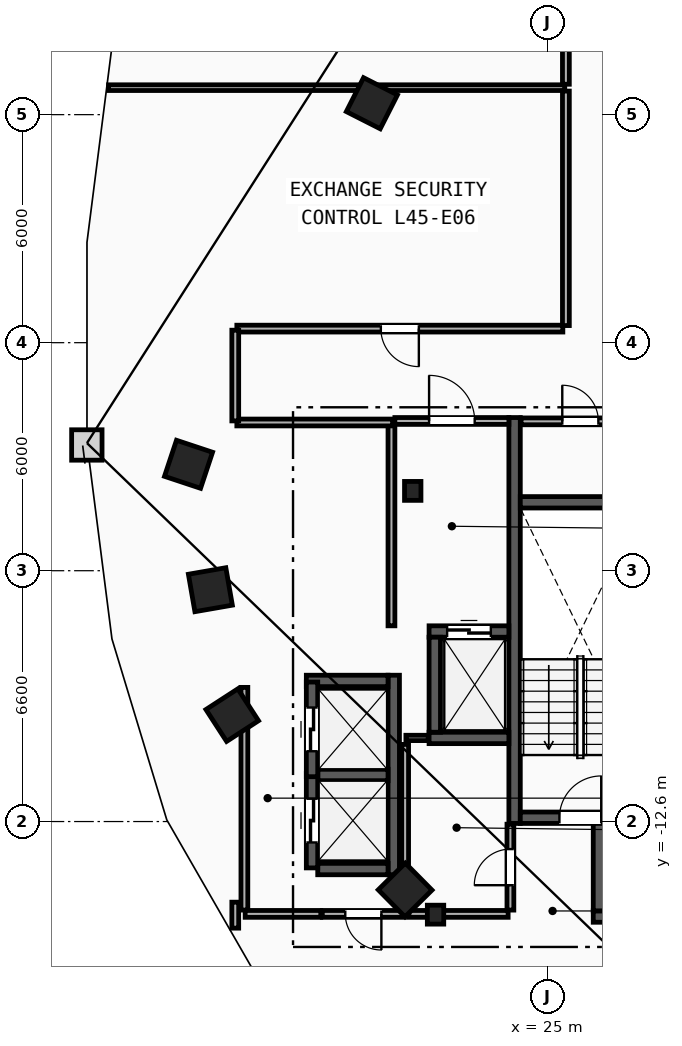
"""IFC4 building model, lengths in metres.
Left out: names, types, materials, properties, quantities, classifications, styles, units other than length and angle.
Written with IfcOpenShell. Run it as: python <this file> out.ifc"""

import sys

from ifc_helpers import new_model, si_unit, direction, frame, frame_2d, origin, origin_2d, place, context, subcontext, project, spatial, rectangle, i_section, extrude, element, fill, save


model = new_model("IFC4")
c1 = context("Model", 3, precision=1e-05, world=origin(), true_north=direction((0.0, 1.0)))
c2 = subcontext(c1, "Body", "Model", "MODEL_VIEW")
j1 = project(units=[si_unit("LENGTHUNIT", "METRE"), si_unit("PLANEANGLEUNIT", "RADIAN")], contexts=[c1])
p1 = place(None, origin())
s1 = spatial("IfcSite", under=j1, at=p1, CompositionType="ELEMENT")
p2 = place(p1, origin())
s2 = spatial("IfcBuilding", under=s1, at=p2, CompositionType="ELEMENT")
p3 = place(p2, frame((0.0, 0.0, 172.8)))
s3 = spatial("IfcBuildingStorey", under=s2, at=p3, CompositionType="ELEMENT", Elevation=172.8)
for number, where, z_axis, x_axis in (
    (1, (21.45, -3.9, 0.0), (0.0, 0.0, 1.0), (1.0, 0.0, 0.0)),
    (2, (22.05, -15.05, 0.0), (0.0, 0.0, 1.0), (1.0, 0.0, 0.0)),
):
    element("IfcColumn", number, at=place(p3, frame(where, z_axis=z_axis, x_axis=x_axis)), inside=s3, PredefinedType="COLUMN", context=c2, shape_type="SweptSolid", body=[
        extrude(i_section(OverallWidth=0.432, OverallDepth=0.498, WebThickness=0.056, FlangeThickness=0.089, FilletRadius=0.018, at=origin_2d()), origin(), (0.0, 0.0, 1.0), 3.6),
    ])
for number, where, z_axis, x_axis in (
    (3, (15.55, -3.2, 0.0), (0.0, 0.0, 1.0), (-0.315, -0.949, 0.0)),
    (4, (16.125, -6.5, 0.0), (0.0, 0.0, 1.0), (0.172, -0.985, 0.0)),
    (5, (16.7, -9.8, 0.0), (0.0, 0.0, 1.0), (0.544, -0.839, 0.0)),
    (6, (21.25, -14.4, 0.0), (0.0, 0.0, 1.0), (0.703, -0.711, 0.0)),
    (7, (20.375, 6.3, 0.0), (0.0, 0.0, 1.0), (-0.453, -0.892, 0.0)),
):
    element("IfcColumn", number, at=place(p3, frame(where, z_axis=z_axis, x_axis=x_axis)), inside=s3, PredefinedType="COLUMN", context=c2, shape_type="SweptSolid", body=[
        extrude(rectangle(XDim=1.0, YDim=1.0, at=origin_2d()), origin(), (0.0, 0.0, 1.0), 3.6),
    ])
p4 = place(p3, frame((24.13, -12.65, 0.0), z_axis=(0.0, 0.0, 1.0), x_axis=(0.0, 1.0, 0.0)))
e8 = element("IfcWall", 8, at=p4, inside=s3, PredefinedType="SHEAR", context=c2, shape_type="SweptSolid", body=[
    extrude(rectangle(XDim=10.68, YDim=0.3, at=frame_2d((5.34, 0.0))), origin(), (0.0, 0.0, 1.0), 3.36),
])
p5 = place(p3, frame((24.28, -12.5, 0.0), z_axis=(0.0, 0.0, 1.0), x_axis=(1.0, 0.0, 0.0)))
e9 = element("IfcWall", 9, at=p5, inside=s3, PredefinedType="SHEAR", context=c2, shape_type="SweptSolid", body=[
    extrude(rectangle(XDim=3.16, YDim=0.3, at=frame_2d((1.58, 0.0))), origin(), (0.0, 0.0, 1.0), 3.36),
])
p6 = place(p5, frame((1.03, 0.0, 0.0)))
e10 = element("IfcOpeningElement", 10, at=p6, cuts=e9, PredefinedType="OPENING", context=c2, shape_type="SweptSolid", body=[
    extrude(rectangle(XDim=1.1, YDim=2.15, at=frame_2d((0.55, 1.075))), frame((0.0, 0.16, 0.0), z_axis=(0.0, -1.0, 0.0), x_axis=(1.0, 0.0, 0.0)), (0.0, 0.0, 1.0), 0.32),
])
p7 = place(p3, frame((24.28, -4.2, 0.0), z_axis=(0.0, 0.0, 1.0), x_axis=(1.0, 0.0, 0.0)))
e11 = element("IfcWall", 11, at=p7, inside=s3, PredefinedType="SHEAR", context=c2, shape_type="SweptSolid", body=[
    extrude(rectangle(XDim=3.16, YDim=0.3, at=frame_2d((1.58, 0.0))), origin(), (0.0, 0.0, 1.0), 3.36),
])
p8 = place(p3, frame((20.89, -7.45, 0.0), z_axis=(0.0, 0.0, 1.0), x_axis=(0.0, 1.0, 0.0)))
e12 = element("IfcWall", 12, at=p8, inside=s3, PredefinedType="PARTITIONING", context=c2, shape_type="SweptSolid", body=[
    extrude(rectangle(XDim=5.3, YDim=0.18, at=frame_2d((2.65, 0.0))), origin(), (0.0, 0.0, 1.0), 3.36),
])
p9 = place(p3, frame((20.98, -2.06, 0.0), z_axis=(0.0, 0.0, 1.0), x_axis=(1.0, 0.0, 0.0)))
e13 = element("IfcWall", 13, at=p9, inside=s3, PredefinedType="PARTITIONING", context=c2, shape_type="SweptSolid", body=[
    extrude(rectangle(XDim=3.0, YDim=0.18, at=frame_2d((1.5, 0.0))), origin(), (0.0, 0.0, 1.0), 3.36),
])
p10 = place(p9, frame((0.9, 0.0, 0.0)))
e14 = element("IfcOpeningElement", 14, at=p10, cuts=e13, PredefinedType="OPENING", context=c2, shape_type="SweptSolid", body=[
    extrude(rectangle(XDim=1.2, YDim=2.15, at=frame_2d((0.6, 1.075))), frame((0.0, 0.1, 0.0), z_axis=(0.0, -1.0, 0.0), x_axis=(1.0, 0.0, 0.0)), (0.0, 0.0, 1.0), 0.2),
])
p11 = place(p3, frame((21.88, -7.6, 0.0), z_axis=(0.0, 0.0, 1.0), x_axis=(1.0, 0.0, 0.0)))
e15 = element("IfcWall", 15, at=p11, inside=s3, PredefinedType="SHEAR", context=c2, shape_type="SweptSolid", body=[
    extrude(rectangle(XDim=2.1, YDim=0.3, at=frame_2d((1.05, 0.0))), origin(), (0.0, 0.0, 1.0), 3.36),
])
p12 = place(p11, frame((0.475, 0.0, 0.0)))
e16 = element("IfcOpeningElement", 16, at=p12, cuts=e15, PredefinedType="OPENING", context=c2, shape_type="SweptSolid", body=[
    extrude(rectangle(XDim=1.15, YDim=2.2, at=frame_2d((0.575, 1.1))), frame((0.0, 0.16, 0.0), z_axis=(0.0, -1.0, 0.0), x_axis=(1.0, 0.0, 0.0)), (0.0, 0.0, 1.0), 0.32),
])
p13 = place(p3, frame((21.88, -10.4, 0.0), z_axis=(0.0, 0.0, 1.0), x_axis=(1.0, 0.0, 0.0)))
e17 = element("IfcWall", 17, at=p13, inside=s3, PredefinedType="SHEAR", context=c2, shape_type="SweptSolid", body=[
    extrude(rectangle(XDim=2.1, YDim=0.3, at=frame_2d((1.05, 0.0))), origin(), (0.0, 0.0, 1.0), 3.36),
])
for number, where, z_axis, x_axis in (
    (18, (22.03, -10.25, 0.0), (0.0, 0.0, 1.0), (0.0, 1.0, 0.0)),
    (19, (26.2, -15.1, 0.0), (0.0, 0.0, 1.0), (1.0, 0.0, 0.0)),
):
    element("IfcWall", number, at=place(p3, frame(where, z_axis=z_axis, x_axis=x_axis)), inside=s3, PredefinedType="SHEAR", context=c2, shape_type="SweptSolid", body=[
        extrude(rectangle(XDim=2.5, YDim=0.3, at=frame_2d((1.25, 0.0))), origin(), (0.0, 0.0, 1.0), 3.36),
    ])
p14 = place(p3, frame((26.35, -14.95, 0.0), z_axis=(0.0, 0.0, 1.0), x_axis=(0.0, 1.0, 0.0)))
e20 = element("IfcWall", 20, at=p14, inside=s3, PredefinedType="SHEAR", context=c2, shape_type="SweptSolid", body=[
    extrude(rectangle(XDim=2.3, YDim=0.3, at=frame_2d((1.15, 0.0))), origin(), (0.0, 0.0, 1.0), 3.36),
])
p15 = place(p3, frame((20.95, -14.0, 0.0), z_axis=(0.0, 0.0, 1.0), x_axis=(0.0, 1.0, 0.0)))
e21 = element("IfcWall", 21, at=p15, inside=s3, PredefinedType="SHEAR", context=c2, shape_type="SweptSolid", body=[
    extrude(rectangle(XDim=5.25, YDim=0.3, at=frame_2d((2.625, 0.0))), origin(), (0.0, 0.0, 1.0), 3.36),
])
p16 = place(p3, frame((18.95, -13.85, 0.0), z_axis=(0.0, 0.0, 1.0), x_axis=(1.0, 0.0, 0.0)))
e22 = element("IfcWall", 22, at=p16, inside=s3, PredefinedType="SHEAR", context=c2, shape_type="SweptSolid", body=[
    extrude(rectangle(XDim=1.85, YDim=0.3, at=frame_2d((0.925, 0.0))), origin(), (0.0, 0.0, 1.0), 3.36),
])
p17 = place(p3, frame((18.65, -8.9, 0.0), z_axis=(0.0, 0.0, 1.0), x_axis=(1.0, 0.0, 0.0)))
e23 = element("IfcWall", 23, at=p17, inside=s3, PredefinedType="SHEAR", context=c2, shape_type="SweptSolid", body=[
    extrude(rectangle(XDim=2.15, YDim=0.3, at=frame_2d((1.075, 0.0))), origin(), (0.0, 0.0, 1.0), 3.36),
])
p18 = place(p3, frame((18.95, -11.375, 0.0), z_axis=(0.0, 0.0, 1.0), x_axis=(1.0, 0.0, 0.0)))
e24 = element("IfcWall", 24, at=p18, inside=s3, PredefinedType="SHEAR", context=c2, shape_type="SweptSolid", body=[
    extrude(rectangle(XDim=1.85, YDim=0.3, at=frame_2d((0.925, 0.0))), origin(), (0.0, 0.0, 1.0), 3.36),
])
p19 = place(p3, frame((18.8, -13.82, 0.0), z_axis=(0.0, 0.0, 1.0), x_axis=(0.0, 1.0, 0.0)))
e25 = element("IfcWall", 25, at=p19, inside=s3, PredefinedType="SHEAR", context=c2, shape_type="SweptSolid", body=[
    extrude(rectangle(XDim=2.49, YDim=0.3, at=frame_2d((1.245, 0.0))), origin(), (0.0, 0.0, 1.0), 3.36),
])
p20 = place(p19, frame((0.67, 0.0, 0.0)))
e26 = element("IfcOpeningElement", 26, at=p20, cuts=e25, PredefinedType="OPENING", context=c2, shape_type="SweptSolid", body=[
    extrude(rectangle(XDim=1.15, YDim=2.2, at=frame_2d((0.575, 1.1))), frame((0.0, 0.16, 0.0), z_axis=(0.0, -1.0, 0.0), x_axis=(1.0, 0.0, 0.0)), (0.0, 0.0, 1.0), 0.32),
])
p21 = place(p3, frame((18.8, -11.42, 0.0), z_axis=(0.0, 0.0, 1.0), x_axis=(0.0, 1.0, 0.0)))
e27 = element("IfcWall", 27, at=p21, inside=s3, PredefinedType="SHEAR", context=c2, shape_type="SweptSolid", body=[
    extrude(rectangle(XDim=2.49, YDim=0.3, at=frame_2d((1.245, 0.0))), origin(), (0.0, 0.0, 1.0), 3.36),
])
p22 = place(p21, frame((0.67, 0.0, 0.0)))
e28 = element("IfcOpeningElement", 28, at=p22, cuts=e27, PredefinedType="OPENING", context=c2, shape_type="SweptSolid", body=[
    extrude(rectangle(XDim=1.15, YDim=2.2, at=frame_2d((0.575, 1.1))), frame((0.0, 0.16, 0.0), z_axis=(0.0, -1.0, 0.0), x_axis=(1.0, 0.0, 0.0)), (0.0, 0.0, 1.0), 0.32),
])
p23 = place(p3, frame((17.02, -14.93, 0.0), z_axis=(0.0, 0.0, 1.0), x_axis=(0.0, 1.0, 0.0)))
e29 = element("IfcWall", 29, at=p23, inside=s3, PredefinedType="PARTITIONING", context=c2, shape_type="SweptSolid", body=[
    extrude(rectangle(XDim=5.86, YDim=0.18, at=frame_2d((2.93, 0.0))), origin(), (0.0, 0.0, 1.0), 3.36),
])
p24 = place(p3, frame((17.04, -15.03, 0.0), z_axis=(0.0, 0.0, 1.0), x_axis=(1.0, 0.0, 0.0)))
e30 = element("IfcWall", 30, at=p24, inside=s3, PredefinedType="PARTITIONING", context=c2, shape_type="SweptSolid", body=[
    extrude(rectangle(XDim=1.99, YDim=0.18, at=frame_2d((0.995, 0.0))), origin(), (0.0, 0.0, 1.0), 3.36),
])
p25 = place(p3, frame((21.23, -15.03, 0.0), z_axis=(0.0, 0.0, 1.0), x_axis=(-1.0, 0.0, 0.0)))
e31 = element("IfcWall", 31, at=p25, inside=s3, PredefinedType="PARTITIONING", context=c2, shape_type="SweptSolid", body=[
    extrude(rectangle(XDim=2.16, YDim=0.18, at=frame_2d((1.08, 0.0))), origin(), (0.0, 0.0, 1.0), 3.36),
])
p26 = place(p25, frame((0.605, 0.0, 0.0)))
e32 = element("IfcOpeningElement", 32, at=p26, cuts=e31, PredefinedType="OPENING", context=c2, shape_type="SweptSolid", body=[
    extrude(rectangle(XDim=0.95, YDim=2.1, at=frame_2d((0.475, 1.05))), frame((0.0, 0.1, 0.0), z_axis=(0.0, -1.0, 0.0), x_axis=(1.0, 0.0, 0.0)), (0.0, 0.0, 1.0), 0.2),
])
p27 = place(p3, frame((21.27, -10.4, 0.0), z_axis=(0.0, 0.0, 1.0), x_axis=(1.0, 0.0, 0.0)))
e33 = element("IfcWall", 33, at=p27, inside=s3, PredefinedType="PARTITIONING", context=c2, shape_type="SweptSolid", body=[
    extrude(rectangle(XDim=0.59, YDim=0.14, at=frame_2d((0.295, 0.0))), origin(), (0.0, 0.0, 1.0), 3.36),
])
p28 = place(p3, frame((21.25, -14.93, 0.0), z_axis=(0.0, 0.0, 1.0), x_axis=(0.0, 1.0, 0.0)))
e34 = element("IfcWall", 34, at=p28, inside=s3, PredefinedType="PARTITIONING", context=c2, shape_type="SweptSolid", body=[
    extrude(rectangle(XDim=4.36, YDim=0.18, at=frame_2d((2.18, 0.0))), origin(), (0.0, 0.0, 1.0), 3.36),
])
p29 = place(p3, frame((21.35, -15.03, 0.0), z_axis=(0.0, 0.0, 1.0), x_axis=(1.0, 0.0, 0.0)))
e35 = element("IfcWall", 35, at=p29, inside=s3, PredefinedType="PARTITIONING", context=c2, shape_type="SweptSolid", body=[
    extrude(rectangle(XDim=2.61, YDim=0.18, at=frame_2d((1.305, 0.0))), origin(), (0.0, 0.0, 1.0), 2.433),
])
p30 = place(p3, frame((24.3, -2.07, 0.0), z_axis=(0.0, 0.0, 1.0), x_axis=(1.0, 0.0, 0.0)))
e36 = element("IfcWall", 36, at=p30, inside=s3, PredefinedType="PARTITIONING", context=c2, shape_type="SweptSolid", body=[
    extrude(rectangle(XDim=3.12, YDim=0.18, at=frame_2d((1.56, 0.0))), origin(), (0.0, 0.0, 1.0), 3.36),
])
p31 = place(p30, frame((1.085, 0.0, 0.0)))
e37 = element("IfcOpeningElement", 37, at=p31, cuts=e36, PredefinedType="OPENING", context=c2, shape_type="SweptSolid", body=[
    extrude(rectangle(XDim=0.95, YDim=2.1, at=frame_2d((0.475, 1.05))), frame((0.0, 0.1, 0.0), z_axis=(0.0, -1.0, 0.0), x_axis=(1.0, 0.0, 0.0)), (0.0, 0.0, 1.0), 0.2),
])
p32 = place(p3, frame((24.02, -14.93, 0.0), z_axis=(0.0, 0.0, 1.0), x_axis=(0.0, 1.0, 0.0)))
e38 = element("IfcWall", 38, at=p32, inside=s3, PredefinedType="PARTITIONING", context=c2, shape_type="SweptSolid", body=[
    extrude(rectangle(XDim=2.26, YDim=0.18, at=frame_2d((1.13, 0.0))), origin(), (0.0, 0.0, 1.0), 3.36),
])
p33 = place(p32, frame((0.655, 0.0, 0.0)))
e39 = element("IfcOpeningElement", 39, at=p33, cuts=e38, PredefinedType="OPENING", context=c2, shape_type="SweptSolid", body=[
    extrude(rectangle(XDim=0.95, YDim=2.1, at=frame_2d((0.475, 1.05))), frame((0.0, 0.1, 0.0), z_axis=(0.0, -1.0, 0.0), x_axis=(1.0, 0.0, 0.0)), (0.0, 0.0, 1.0), 0.2),
])
p34 = place(p3, frame((13.447, 6.71, 0.0), z_axis=(0.0, 0.0, 1.0), x_axis=(1.0, 0.0, 0.0)))
e40 = element("IfcWall", 40, at=p34, inside=s3, PredefinedType="PARTITIONING", context=c2, shape_type="SweptSolid", body=[
    extrude(rectangle(XDim=12.003, YDim=0.15, at=frame_2d((6.001, 0.0))), origin(), (0.0, 0.0, 1.0), 3.36),
])
p35 = place(p3, frame((25.4, 0.37, 0.0), z_axis=(0.0, 0.0, 1.0), x_axis=(-1.0, 0.0, 0.0)))
e41 = element("IfcWall", 41, at=p35, inside=s3, PredefinedType="PARTITIONING", context=c2, shape_type="SweptSolid", body=[
    extrude(rectangle(XDim=8.578, YDim=0.18, at=frame_2d((4.289, 0.0))), origin(), (0.0, 0.0, 1.0), 3.36),
])
p36 = place(p35, frame((3.789, 0.0, 0.0)))
e42 = element("IfcOpeningElement", 42, at=p36, cuts=e41, PredefinedType="OPENING", context=c2, shape_type="SweptSolid", body=[
    extrude(rectangle(XDim=1.0, YDim=2.15, at=frame_2d((0.5, 1.075))), frame((0.0, 0.1, 0.0), z_axis=(0.0, -1.0, 0.0), x_axis=(1.0, 0.0, 0.0)), (0.0, 0.0, 1.0), 0.2),
])
p37 = place(p3, frame((25.48, 6.62, 0.0), z_axis=(0.0, 0.0, 1.0), x_axis=(0.0, -1.0, 0.0)))
e43 = element("IfcWall", 43, at=p37, inside=s3, PredefinedType="PARTITIONING", context=c2, shape_type="SweptSolid", body=[
    extrude(rectangle(XDim=6.17, YDim=0.18, at=frame_2d((3.085, 0.0))), origin(), (0.0, 0.0, 1.0), 3.36),
])
p38 = place(p3, frame((16.822, -2.1, 0.0), z_axis=(0.0, 0.0, 1.0), x_axis=(1.0, 0.0, 0.0)))
e44 = element("IfcWall", 44, at=p38, inside=s3, PredefinedType="PARTITIONING", context=c2, shape_type="SweptSolid", body=[
    extrude(rectangle(XDim=4.098, YDim=0.18, at=frame_2d((2.049, 0.0))), origin(), (0.0, 0.0, 1.0), 3.36),
])
p39 = place(p3, frame((16.78, 0.329, 0.0), z_axis=(0.0, 0.0, 1.0), x_axis=(0.0, -1.0, 0.0)))
e45 = element("IfcWall", 45, at=p39, inside=s3, PredefinedType="PARTITIONING", context=c2, shape_type="SweptSolid", body=[
    extrude(rectangle(XDim=2.387, YDim=0.18, at=frame_2d((1.194, 0.0))), origin(), (0.0, 0.0, 1.0), 3.36),
])
p40 = place(p3, frame((16.78, -14.721, 0.0), z_axis=(0.0, 0.0, 1.0), x_axis=(0.0, -1.0, 0.0)))
e46 = element("IfcWall", 46, at=p40, inside=s3, PredefinedType="PARTITIONING", context=c2, shape_type="SweptSolid", body=[
    extrude(rectangle(XDim=0.684, YDim=0.18, at=frame_2d((0.342, 0.0))), origin(), (0.0, 0.0, 1.0), 3.36),
])
p41 = place(p3, frame((25.48, 11.178, 0.0), z_axis=(0.0, 0.0, 1.0), x_axis=(0.0, -1.0, 0.0)))
e47 = element("IfcWall", 47, at=p41, inside=s3, PredefinedType="PARTITIONING", context=c2, shape_type="SweptSolid", body=[
    extrude(rectangle(XDim=4.378, YDim=0.18, at=frame_2d((2.189, 0.0))), origin(), (0.0, 0.0, 1.0), 3.36),
])
p42 = place(p41, frame((1.689, 0.0, 0.0)))
e48 = element("IfcOpeningElement", 48, at=p42, cuts=e47, PredefinedType="OPENING", context=c2, shape_type="SweptSolid", body=[
    extrude(rectangle(XDim=1.0, YDim=2.15, at=frame_2d((0.5, 1.075))), frame((0.0, 0.1, 0.0), z_axis=(0.0, -1.0, 0.0), x_axis=(1.0, 0.0, 0.0)), (0.0, 0.0, 1.0), 0.2),
])
p43 = place(p6, origin())
e49 = element("IfcDoor", 49, at=p43, inside=s3, OperationType="SINGLE_SWING_RIGHT", PredefinedType="DOOR", context=c2, shape_type="SweptSolid", body=[
    extrude(rectangle(XDim=1.1, YDim=2.15, at=frame_2d((0.55, 1.075))), frame((0.0, 0.025, 0.0), z_axis=(0.0, -1.0, 0.0), x_axis=(1.0, 0.0, 0.0)), (0.0, 0.0, 1.0), 0.05),
])
fill(e10, e49)
p44 = place(p10, origin())
e50 = element("IfcDoor", 50, at=p44, inside=s3, OperationType="SINGLE_SWING_LEFT", PredefinedType="DOOR", context=c2, shape_type="SweptSolid", body=[
    extrude(rectangle(XDim=1.2, YDim=2.15, at=frame_2d((0.6, 1.075))), frame((0.0, 0.025, 0.0), z_axis=(0.0, -1.0, 0.0), x_axis=(1.0, 0.0, 0.0)), (0.0, 0.0, 1.0), 0.05),
])
fill(e14, e50)
p45 = place(p12, origin())
e51 = element("IfcDoor", 51, at=p45, inside=s3, OperationType="SLIDING_TO_LEFT", PredefinedType="TRAPDOOR", context=c2, shape_type="SweptSolid", body=[
    extrude(rectangle(XDim=1.15, YDim=2.2, at=frame_2d((0.575, 1.1))), frame((0.0, 0.025, 0.0), z_axis=(0.0, -1.0, 0.0), x_axis=(1.0, 0.0, 0.0)), (0.0, 0.0, 1.0), 0.05),
])
fill(e16, e51)
p46 = place(p20, origin())
e52 = element("IfcDoor", 52, at=p46, inside=s3, OperationType="SLIDING_TO_LEFT", PredefinedType="TRAPDOOR", context=c2, shape_type="SweptSolid", body=[
    extrude(rectangle(XDim=1.15, YDim=2.2, at=frame_2d((0.575, 1.1))), frame((0.0, 0.025, 0.0), z_axis=(0.0, -1.0, 0.0), x_axis=(1.0, 0.0, 0.0)), (0.0, 0.0, 1.0), 0.05),
])
fill(e26, e52)
p47 = place(p22, origin())
e53 = element("IfcDoor", 53, at=p47, inside=s3, OperationType="SLIDING_TO_LEFT", PredefinedType="TRAPDOOR", context=c2, shape_type="SweptSolid", body=[
    extrude(rectangle(XDim=1.15, YDim=2.2, at=frame_2d((0.575, 1.1))), frame((0.0, 0.025, 0.0), z_axis=(0.0, -1.0, 0.0), x_axis=(1.0, 0.0, 0.0)), (0.0, 0.0, 1.0), 0.05),
])
fill(e28, e53)
p48 = place(p36, origin())
e54 = element("IfcDoor", 54, at=p48, inside=s3, OperationType="SINGLE_SWING_LEFT", PredefinedType="DOOR", context=c2, shape_type="SweptSolid", body=[
    extrude(rectangle(XDim=1.0, YDim=2.15, at=frame_2d((0.5, 1.075))), frame((0.0, 0.025, 0.0), z_axis=(0.0, -1.0, 0.0), x_axis=(1.0, 0.0, 0.0)), (0.0, 0.0, 1.0), 0.05),
])
fill(e42, e54)
p49 = place(p31, origin())
e55 = element("IfcDoor", 55, at=p49, inside=s3, OperationType="SINGLE_SWING_LEFT", PredefinedType="DOOR", context=c2, shape_type="SweptSolid", body=[
    extrude(rectangle(XDim=0.95, YDim=2.1, at=frame_2d((0.475, 1.05))), frame((0.0, 0.025, 0.0), z_axis=(0.0, -1.0, 0.0), x_axis=(1.0, 0.0, 0.0)), (0.0, 0.0, 1.0), 0.05),
])
fill(e37, e55)
p50 = place(p33, origin())
e56 = element("IfcDoor", 56, at=p50, inside=s3, OperationType="SINGLE_SWING_LEFT", PredefinedType="DOOR", context=c2, shape_type="SweptSolid", body=[
    extrude(rectangle(XDim=0.95, YDim=2.1, at=frame_2d((0.475, 1.05))), frame((0.0, 0.025, 0.0), z_axis=(0.0, -1.0, 0.0), x_axis=(1.0, 0.0, 0.0)), (0.0, 0.0, 1.0), 0.05),
])
fill(e39, e56)
p51 = place(p26, origin())
e57 = element("IfcDoor", 57, at=p51, inside=s3, OperationType="SINGLE_SWING_LEFT", PredefinedType="DOOR", context=c2, shape_type="SweptSolid", body=[
    extrude(rectangle(XDim=0.95, YDim=2.1, at=frame_2d((0.475, 1.05))), frame((0.0, 0.025, 0.0), z_axis=(0.0, -1.0, 0.0), x_axis=(1.0, 0.0, 0.0)), (0.0, 0.0, 1.0), 0.05),
])
fill(e32, e57)
save(model, sys.argv[1])
